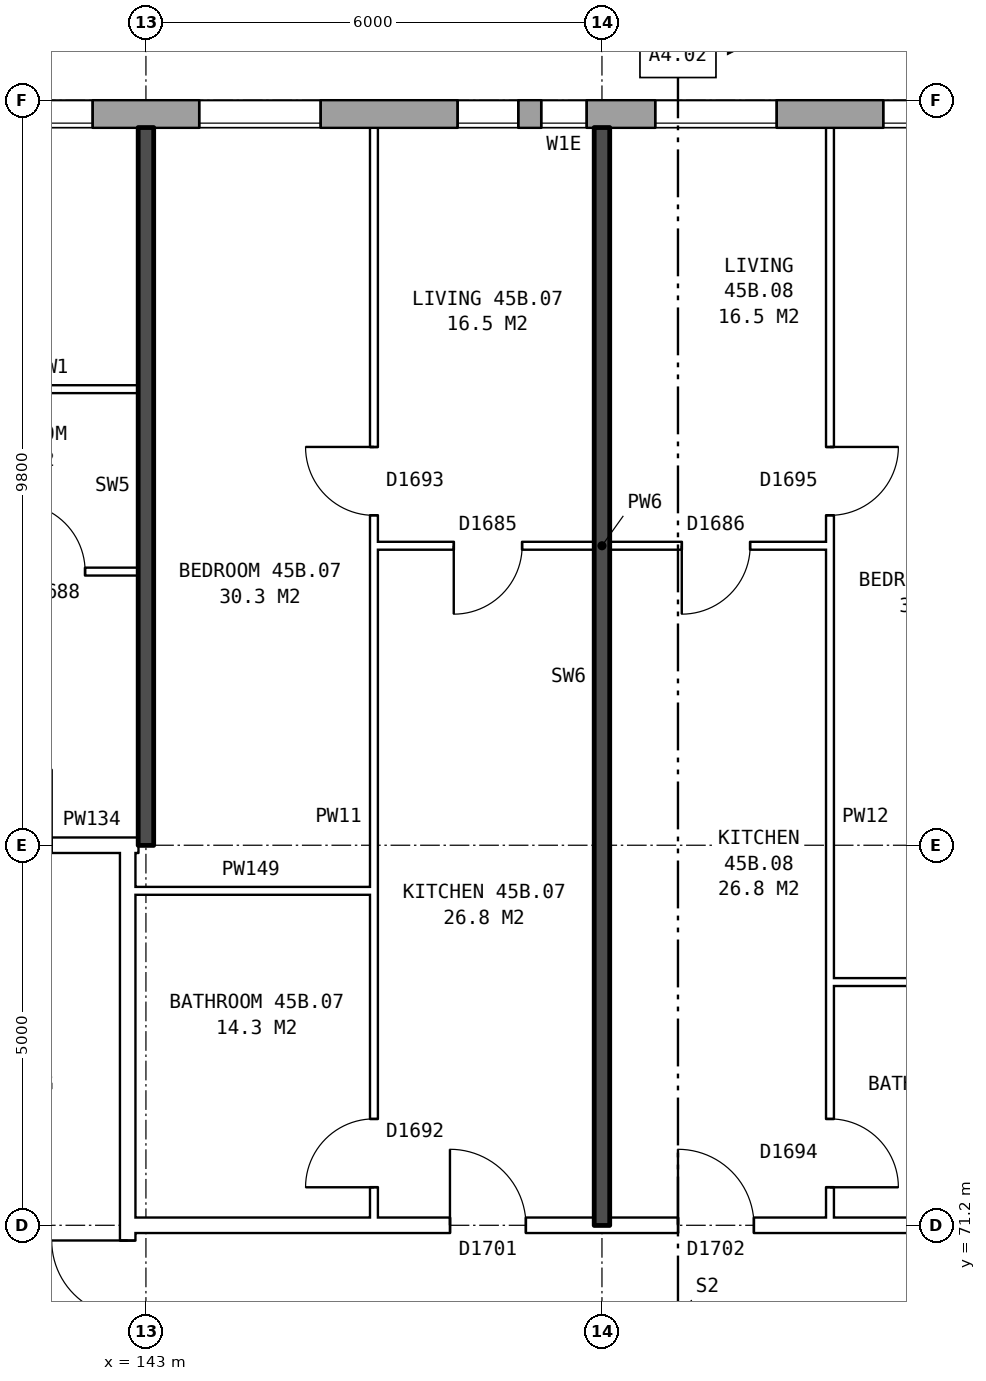
"""IFC4 building model, lengths in metres.
Left out: names, types, materials, properties, quantities, classifications, styles, units other than length and angle.
Written with IfcOpenShell. Run it as: python <this file> out.ifc"""

import sys

from ifc_helpers import new_model, si_unit, direction, frame, frame_2d, origin, place, context, subcontext, project, spatial, rectangle, extrude, element, fill, save


model = new_model("IFC4")
c1 = context("Model", 3, precision=1e-05, world=origin(), true_north=direction((0.0, 1.0)))
c2 = subcontext(c1, "Body", "Model", "MODEL_VIEW")
j1 = project(units=[si_unit("LENGTHUNIT", "METRE"), si_unit("PLANEANGLEUNIT", "RADIAN")], contexts=[c1])
p1 = place(None, origin())
s1 = spatial("IfcSite", under=j1, at=p1, CompositionType="ELEMENT")
p2 = place(p1, origin())
s2 = spatial("IfcBuilding", under=s1, at=p2, CompositionType="ELEMENT")
p3 = place(p2, frame((0.0, 0.0, 160.9)))
s3 = spatial("IfcBuildingStorey", under=s2, at=p3, CompositionType="ELEMENT", Elevation=160.9)
p4 = place(p3, frame((168.425, 85.82, 0.0), z_axis=(0.0, 0.0, 1.0), x_axis=(-1.0, 0.0, 0.0)))
e1 = element("IfcWall", 1, at=p4, inside=s3, PredefinedType="STANDARD", context=c2, shape_type="SweptSolid", body=[
    extrude(rectangle(XDim=34.351, YDim=0.36, at=frame_2d((17.175, 0.0))), origin(), (0.0, 0.0, 1.0), 2.85),
])
p5 = place(p4, frame((2.125, 0.0, 0.8)))
e2 = element("IfcOpeningElement", 2, at=p5, cuts=e1, PredefinedType="OPENING", context=c2, shape_type="SweptSolid", body=[
    extrude(rectangle(XDim=1.6, YDim=1.8, at=frame_2d((0.8, 0.9))), frame((0.0, 0.19, 0.0), z_axis=(0.0, -1.0, 0.0), x_axis=(1.0, 0.0, 0.0)), (0.0, 0.0, 1.0), 0.38),
])
p6 = place(p4, frame((5.125, 0.0, 0.8)))
e3 = element("IfcOpeningElement", 3, at=p6, cuts=e1, PredefinedType="OPENING", context=c2, shape_type="SweptSolid", body=[
    extrude(rectangle(XDim=1.6, YDim=1.8, at=frame_2d((0.8, 0.9))), frame((0.0, 0.19, 0.0), z_axis=(0.0, -1.0, 0.0), x_axis=(1.0, 0.0, 0.0)), (0.0, 0.0, 1.0), 0.38),
])
p7 = place(p4, frame((8.125, 0.0, 0.8)))
e4 = element("IfcOpeningElement", 4, at=p7, cuts=e1, PredefinedType="OPENING", context=c2, shape_type="SweptSolid", body=[
    extrude(rectangle(XDim=1.6, YDim=1.8, at=frame_2d((0.8, 0.9))), frame((0.0, 0.19, 0.0), z_axis=(0.0, -1.0, 0.0), x_axis=(1.0, 0.0, 0.0)), (0.0, 0.0, 1.0), 0.38),
])
p8 = place(p4, frame((10.025, 0.0, 0.8)))
e5 = element("IfcOpeningElement", 5, at=p8, cuts=e1, PredefinedType="OPENING", context=c2, shape_type="SweptSolid", body=[
    extrude(rectangle(XDim=1.0, YDim=1.8, at=frame_2d((0.5, 0.9))), frame((0.0, 0.19, 0.0), z_axis=(0.0, -1.0, 0.0), x_axis=(1.0, 0.0, 0.0)), (0.0, 0.0, 1.0), 0.38),
])
p9 = place(p4, frame((14.125, 0.0, 0.8)))
e6 = element("IfcOpeningElement", 6, at=p9, cuts=e1, PredefinedType="OPENING", context=c2, shape_type="SweptSolid", body=[
    extrude(rectangle(XDim=1.6, YDim=1.8, at=frame_2d((0.8, 0.9))), frame((0.0, 0.19, 0.0), z_axis=(0.0, -1.0, 0.0), x_axis=(1.0, 0.0, 0.0)), (0.0, 0.0, 1.0), 0.38),
])
p10 = place(p4, frame((17.125, 0.0, 0.8)))
e7 = element("IfcOpeningElement", 7, at=p10, cuts=e1, PredefinedType="OPENING", context=c2, shape_type="SweptSolid", body=[
    extrude(rectangle(XDim=1.6, YDim=1.8, at=frame_2d((0.8, 0.9))), frame((0.0, 0.19, 0.0), z_axis=(0.0, -1.0, 0.0), x_axis=(1.0, 0.0, 0.0)), (0.0, 0.0, 1.0), 0.38),
])
p11 = place(p4, frame((19.625, 0.0, 0.65)))
e8 = element("IfcOpeningElement", 8, at=p11, cuts=e1, PredefinedType="OPENING", context=c2, shape_type="SweptSolid", body=[
    extrude(rectangle(XDim=0.6, YDim=1.8, at=frame_2d((0.3, 0.9))), frame((0.0, 0.19, 0.0), z_axis=(0.0, -1.0, 0.0), x_axis=(1.0, 0.0, 0.0)), (0.0, 0.0, 1.0), 0.38),
])
p12 = place(p4, frame((23.125, 0.0, 0.8)))
e9 = element("IfcOpeningElement", 9, at=p12, cuts=e1, PredefinedType="OPENING", context=c2, shape_type="SweptSolid", body=[
    extrude(rectangle(XDim=1.6, YDim=1.8, at=frame_2d((0.8, 0.9))), frame((0.0, 0.19, 0.0), z_axis=(0.0, -1.0, 0.0), x_axis=(1.0, 0.0, 0.0)), (0.0, 0.0, 1.0), 0.38),
])
p13 = place(p4, frame((26.125, 0.0, 0.8)))
e10 = element("IfcOpeningElement", 10, at=p13, cuts=e1, PredefinedType="OPENING", context=c2, shape_type="SweptSolid", body=[
    extrude(rectangle(XDim=1.6, YDim=1.8, at=frame_2d((0.8, 0.9))), frame((0.0, 0.19, 0.0), z_axis=(0.0, -1.0, 0.0), x_axis=(1.0, 0.0, 0.0)), (0.0, 0.0, 1.0), 0.38),
])
p14 = place(p4, frame((29.125, 0.0, 0.8)))
e11 = element("IfcOpeningElement", 11, at=p14, cuts=e1, PredefinedType="OPENING", context=c2, shape_type="SweptSolid", body=[
    extrude(rectangle(XDim=1.6, YDim=1.8, at=frame_2d((0.8, 0.9))), frame((0.0, 0.19, 0.0), z_axis=(0.0, -1.0, 0.0), x_axis=(1.0, 0.0, 0.0)), (0.0, 0.0, 1.0), 0.38),
])
p15 = place(p4, frame((32.125, 0.0, 0.8)))
e12 = element("IfcOpeningElement", 12, at=p15, cuts=e1, PredefinedType="OPENING", context=c2, shape_type="SweptSolid", body=[
    extrude(rectangle(XDim=1.6, YDim=1.8, at=frame_2d((0.8, 0.9))), frame((0.0, 0.19, 0.0), z_axis=(0.0, -1.0, 0.0), x_axis=(1.0, 0.0, 0.0)), (0.0, 0.0, 1.0), 0.38),
])
p16 = place(p4, frame((11.325, 0.0, 1.7)))
e13 = element("IfcOpeningElement", 13, at=p16, cuts=e1, PredefinedType="OPENING", context=c2, shape_type="SweptSolid", body=[
    extrude(rectangle(XDim=0.8, YDim=0.9, at=frame_2d((0.4, 0.45))), frame((0.0, 0.19, 0.0), z_axis=(0.0, -1.0, 0.0), x_axis=(1.0, 0.0, 0.0)), (0.0, 0.0, 1.0), 0.38),
])
p17 = place(p4, frame((20.525, 0.0, 0.55)))
e14 = element("IfcOpeningElement", 14, at=p17, cuts=e1, PredefinedType="OPENING", context=c2, shape_type="SweptSolid", body=[
    extrude(rectangle(XDim=0.8, YDim=0.9, at=frame_2d((0.4, 0.45))), frame((0.0, 0.19, 0.0), z_axis=(0.0, -1.0, 0.0), x_axis=(1.0, 0.0, 0.0)), (0.0, 0.0, 1.0), 0.38),
])
p18 = place(p3, frame((142.76, 63.9, 0.0), z_axis=(0.0, 0.0, 1.0), x_axis=(0.0, 1.0, 0.0)))
e15 = element("IfcWall", 15, at=p18, inside=s3, PredefinedType="PARTITIONING", context=c2, shape_type="SweptSolid", body=[
    extrude(rectangle(XDim=12.2, YDim=0.2, at=frame_2d((6.1, 0.0))), origin(), (0.0, 0.0, 1.0), 2.85),
])
p19 = place(p18, frame((5.1, 0.0, 0.0)))
e16 = element("IfcOpeningElement", 16, at=p19, cuts=e15, PredefinedType="OPENING", context=c2, shape_type="SweptSolid", body=[
    extrude(rectangle(XDim=2.0, YDim=2.1, at=frame_2d((1.0, 1.05))), frame((0.0, 0.11, 0.0), z_axis=(0.0, -1.0, 0.0), x_axis=(1.0, 0.0, 0.0)), (0.0, 0.0, 1.0), 0.22),
])
p20 = place(p3, frame((142.76, 71.2, 0.0), z_axis=(0.0, 0.0, 1.0), x_axis=(1.0, 0.0, 0.0)))
e17 = element("IfcWall", 17, at=p20, inside=s3, PredefinedType="PARTITIONING", context=c2, shape_type="SweptSolid", body=[
    extrude(rectangle(XDim=14.48, YDim=0.2, at=frame_2d((7.24, 0.0))), origin(), (0.0, 0.0, 1.0), 2.85),
])
p21 = place(p20, frame((4.24, 0.0, 0.0)))
e18 = element("IfcOpeningElement", 18, at=p21, cuts=e17, PredefinedType="OPENING", context=c2, shape_type="SweptSolid", body=[
    extrude(rectangle(XDim=1.0, YDim=2.1, at=frame_2d((0.5, 1.05))), frame((0.0, 0.11, 0.0), z_axis=(0.0, -1.0, 0.0), x_axis=(1.0, 0.0, 0.0)), (0.0, 0.0, 1.0), 0.22),
])
p22 = place(p20, frame((7.24, 0.0, 0.0)))
e19 = element("IfcOpeningElement", 19, at=p22, cuts=e17, PredefinedType="OPENING", context=c2, shape_type="SweptSolid", body=[
    extrude(rectangle(XDim=1.0, YDim=2.1, at=frame_2d((0.5, 1.05))), frame((0.0, 0.11, 0.0), z_axis=(0.0, -1.0, 0.0), x_axis=(1.0, 0.0, 0.0)), (0.0, 0.0, 1.0), 0.22),
])
p23 = place(p3, frame((152.0, 74.4, 0.0), z_axis=(0.0, 0.0, 1.0), x_axis=(1.0, 0.0, 0.0)))
e20 = element("IfcWall", 20, at=p23, inside=s3, PredefinedType="PARTITIONING", context=c2, shape_type="SweptSolid", body=[
    extrude(rectangle(XDim=2.9, YDim=0.1, at=frame_2d((1.45, 0.0))), origin(), (0.0, 0.0, 1.0), 2.85),
])
p24 = place(p3, frame((142.76, 75.6, 0.0), z_axis=(0.0, 0.0, 1.0), x_axis=(1.0, 0.0, 0.0)))
e21 = element("IfcWall", 21, at=p24, inside=s3, PredefinedType="PARTITIONING", context=c2, shape_type="SweptSolid", body=[
    extrude(rectangle(XDim=3.24, YDim=0.1, at=frame_2d((1.62, 0.0))), origin(), (0.0, 0.0, 1.0), 2.85),
])
p25 = place(p3, frame((139.76, 76.2, 0.0), z_axis=(0.0, 0.0, 1.0), x_axis=(1.0, 0.0, 0.0)))
e22 = element("IfcWall", 22, at=p25, inside=s3, PredefinedType="PARTITIONING", context=c2, shape_type="SweptSolid", body=[
    extrude(rectangle(XDim=3.0, YDim=0.2, at=frame_2d((1.5, 0.0))), origin(), (0.0, 0.0, 1.0), 2.85),
])
p26 = place(p25, frame((1.0, 0.0, 0.0)))
e23 = element("IfcOpeningElement", 23, at=p26, cuts=e22, PredefinedType="OPENING", context=c2, shape_type="SweptSolid", body=[
    extrude(rectangle(XDim=1.0, YDim=2.1, at=frame_2d((0.5, 1.05))), frame((0.0, 0.11, 0.0), z_axis=(0.0, -1.0, 0.0), x_axis=(1.0, 0.0, 0.0)), (0.0, 0.0, 1.0), 0.22),
])
p27 = place(p3, frame((142.76, 76.2, 0.0), z_axis=(0.0, 0.0, 1.0), x_axis=(1.0, 0.0, 0.0)))
e24 = element("IfcWall", 24, at=p27, inside=s3, PredefinedType="PARTITIONING", context=c2, shape_type="SweptSolid", body=[
    extrude(rectangle(XDim=0.14, YDim=0.2, at=frame_2d((0.07, 0.0))), origin(), (0.0, 0.0, 1.0), 2.85),
])
p28 = place(p3, frame((137.1, 79.8, 0.0), z_axis=(0.0, 0.0, 1.0), x_axis=(1.0, 0.0, 0.0)))
e25 = element("IfcWall", 25, at=p28, inside=s3, PredefinedType="PARTITIONING", context=c2, shape_type="SweptSolid", body=[
    extrude(rectangle(XDim=5.8, YDim=0.1, at=frame_2d((2.9, 0.0))), origin(), (0.0, 0.0, 1.0), 2.85),
])
p29 = place(p28, frame((1.3, 0.0, 0.0)))
e26 = element("IfcOpeningElement", 26, at=p29, cuts=e25, PredefinedType="OPENING", context=c2, shape_type="SweptSolid", body=[
    extrude(rectangle(XDim=0.9, YDim=2.1, at=frame_2d((0.45, 1.05))), frame((0.0, 0.06, 0.0), z_axis=(0.0, -1.0, 0.0), x_axis=(1.0, 0.0, 0.0)), (0.0, 0.0, 1.0), 0.12),
])
p30 = place(p28, frame((4.2, 0.0, 0.0)))
e27 = element("IfcOpeningElement", 27, at=p30, cuts=e25, PredefinedType="OPENING", context=c2, shape_type="SweptSolid", body=[
    extrude(rectangle(XDim=0.9, YDim=2.1, at=frame_2d((0.45, 1.05))), frame((0.0, 0.06, 0.0), z_axis=(0.0, -1.0, 0.0), x_axis=(1.0, 0.0, 0.0)), (0.0, 0.0, 1.0), 0.12),
])
p31 = place(p3, frame((146.0, 80.14, 0.0), z_axis=(0.0, 0.0, 1.0), x_axis=(1.0, 0.0, 0.0)))
e28 = element("IfcWall", 28, at=p31, inside=s3, PredefinedType="PARTITIONING", context=c2, shape_type="SweptSolid", body=[
    extrude(rectangle(XDim=6.0, YDim=0.1, at=frame_2d((3.0, 0.0))), origin(), (0.0, 0.0, 1.0), 2.85),
])
p32 = place(p31, frame((1.05, 0.0, 0.0)))
e29 = element("IfcOpeningElement", 29, at=p32, cuts=e28, PredefinedType="OPENING", context=c2, shape_type="SweptSolid", body=[
    extrude(rectangle(XDim=0.9, YDim=2.1, at=frame_2d((0.45, 1.05))), frame((0.0, 0.06, 0.0), z_axis=(0.0, -1.0, 0.0), x_axis=(1.0, 0.0, 0.0)), (0.0, 0.0, 1.0), 0.12),
])
p33 = place(p31, frame((4.05, 0.0, 0.0)))
e30 = element("IfcOpeningElement", 30, at=p33, cuts=e28, PredefinedType="OPENING", context=c2, shape_type="SweptSolid", body=[
    extrude(rectangle(XDim=0.9, YDim=2.1, at=frame_2d((0.45, 1.05))), frame((0.0, 0.06, 0.0), z_axis=(0.0, -1.0, 0.0), x_axis=(1.0, 0.0, 0.0)), (0.0, 0.0, 1.0), 0.12),
])
p34 = place(p3, frame((140.6, 82.2, 0.0), z_axis=(0.0, 0.0, 1.0), x_axis=(1.0, 0.0, 0.0)))
e31 = element("IfcWall", 31, at=p34, inside=s3, PredefinedType="PARTITIONING", context=c2, shape_type="SweptSolid", body=[
    extrude(rectangle(XDim=2.3, YDim=0.1, at=frame_2d((1.15, 0.0))), origin(), (0.0, 0.0, 1.0), 2.85),
])
p35 = place(p3, frame((143.0, 76.2, 0.0), z_axis=(0.0, 0.0, 1.0), x_axis=(0.0, 1.0, 0.0)))
e32 = element("IfcWall", 32, at=p35, inside=s3, PredefinedType="SOLIDWALL", context=c2, shape_type="SweptSolid", body=[
    extrude(rectangle(XDim=9.44, YDim=0.2, at=frame_2d((4.72, 0.0))), origin(), (0.0, 0.0, 1.0), 2.85),
])
p36 = place(p3, frame((146.0, 71.3, 0.0), z_axis=(0.0, 0.0, 1.0), x_axis=(0.0, 1.0, 0.0)))
e33 = element("IfcWall", 33, at=p36, inside=s3, PredefinedType="PARTITIONING", context=c2, shape_type="SweptSolid", body=[
    extrude(rectangle(XDim=14.34, YDim=0.1, at=frame_2d((7.17, 0.0))), origin(), (0.0, 0.0, 1.0), 2.85),
])
p37 = place(p36, frame((9.24, 0.0, 0.0)))
e34 = element("IfcOpeningElement", 34, at=p37, cuts=e33, PredefinedType="OPENING", context=c2, shape_type="SweptSolid", body=[
    extrude(rectangle(XDim=0.9, YDim=2.1, at=frame_2d((0.45, 1.05))), frame((0.0, 0.06, 0.0), z_axis=(0.0, -1.0, 0.0), x_axis=(1.0, 0.0, 0.0)), (0.0, 0.0, 1.0), 0.12),
])
p38 = place(p36, frame((0.4, 0.0, 0.0)))
e35 = element("IfcOpeningElement", 35, at=p38, cuts=e33, PredefinedType="OPENING", context=c2, shape_type="SweptSolid", body=[
    extrude(rectangle(XDim=0.9, YDim=2.1, at=frame_2d((0.45, 1.05))), frame((0.0, 0.06, 0.0), z_axis=(0.0, -1.0, 0.0), x_axis=(1.0, 0.0, 0.0)), (0.0, 0.0, 1.0), 0.12),
])
p39 = place(p3, frame((149.0, 71.2, 0.0), z_axis=(0.0, 0.0, 1.0), x_axis=(0.0, 1.0, 0.0)))
e36 = element("IfcWall", 36, at=p39, inside=s3, PredefinedType="SOLIDWALL", context=c2, shape_type="SweptSolid", body=[
    extrude(rectangle(XDim=14.44, YDim=0.2, at=frame_2d((7.22, 0.0))), origin(), (0.0, 0.0, 1.0), 2.85),
])
p40 = place(p3, frame((152.0, 71.3, 0.0), z_axis=(0.0, 0.0, 1.0), x_axis=(0.0, 1.0, 0.0)))
e37 = element("IfcWall", 37, at=p40, inside=s3, PredefinedType="PARTITIONING", context=c2, shape_type="SweptSolid", body=[
    extrude(rectangle(XDim=14.34, YDim=0.1, at=frame_2d((7.17, 0.0))), origin(), (0.0, 0.0, 1.0), 2.85),
])
p41 = place(p40, frame((9.24, 0.0, 0.0)))
e38 = element("IfcOpeningElement", 38, at=p41, cuts=e37, PredefinedType="OPENING", context=c2, shape_type="SweptSolid", body=[
    extrude(rectangle(XDim=0.9, YDim=2.1, at=frame_2d((0.45, 1.05))), frame((0.0, 0.06, 0.0), z_axis=(0.0, -1.0, 0.0), x_axis=(1.0, 0.0, 0.0)), (0.0, 0.0, 1.0), 0.12),
])
p42 = place(p40, frame((0.4, 0.0, 0.0)))
e39 = element("IfcOpeningElement", 39, at=p42, cuts=e37, PredefinedType="OPENING", context=c2, shape_type="SweptSolid", body=[
    extrude(rectangle(XDim=0.9, YDim=2.1, at=frame_2d((0.45, 1.05))), frame((0.0, 0.06, 0.0), z_axis=(0.0, -1.0, 0.0), x_axis=(1.0, 0.0, 0.0)), (0.0, 0.0, 1.0), 0.12),
])
p43 = place(p9, origin())
e40 = element("IfcWindow", 40, at=p43, inside=s3, PartitioningType="SINGLE_PANEL", PredefinedType="WINDOW", context=c2, shape_type="SweptSolid", body=[
    extrude(rectangle(XDim=1.6, YDim=1.8, at=frame_2d((0.8, 0.9))), frame((0.0, 0.15, 0.0), z_axis=(0.0, -1.0, 0.0), x_axis=(1.0, 0.0, 0.0)), (0.0, 0.0, 1.0), 0.06),
])
fill(e6, e40)
p44 = place(p10, origin())
e41 = element("IfcWindow", 41, at=p44, inside=s3, PartitioningType="SINGLE_PANEL", PredefinedType="WINDOW", context=c2, shape_type="SweptSolid", body=[
    extrude(rectangle(XDim=1.6, YDim=1.8, at=frame_2d((0.8, 0.9))), frame((0.0, 0.15, 0.0), z_axis=(0.0, -1.0, 0.0), x_axis=(1.0, 0.0, 0.0)), (0.0, 0.0, 1.0), 0.06),
])
fill(e7, e41)
p45 = place(p11, origin())
e42 = element("IfcWindow", 42, at=p45, inside=s3, PartitioningType="SINGLE_PANEL", PredefinedType="WINDOW", context=c2, shape_type="SweptSolid", body=[
    extrude(rectangle(XDim=0.6, YDim=1.8, at=frame_2d((0.3, 0.9))), frame((0.0, 0.15, 0.0), z_axis=(0.0, -1.0, 0.0), x_axis=(1.0, 0.0, 0.0)), (0.0, 0.0, 1.0), 0.06),
])
fill(e8, e42)
p46 = place(p12, origin())
e43 = element("IfcWindow", 43, at=p46, inside=s3, PartitioningType="SINGLE_PANEL", PredefinedType="WINDOW", context=c2, shape_type="SweptSolid", body=[
    extrude(rectangle(XDim=1.6, YDim=1.8, at=frame_2d((0.8, 0.9))), frame((0.0, 0.15, 0.0), z_axis=(0.0, -1.0, 0.0), x_axis=(1.0, 0.0, 0.0)), (0.0, 0.0, 1.0), 0.06),
])
fill(e9, e43)
p47 = place(p13, origin())
e44 = element("IfcWindow", 44, at=p47, inside=s3, PartitioningType="SINGLE_PANEL", PredefinedType="WINDOW", context=c2, shape_type="SweptSolid", body=[
    extrude(rectangle(XDim=1.6, YDim=1.8, at=frame_2d((0.8, 0.9))), frame((0.0, 0.15, 0.0), z_axis=(0.0, -1.0, 0.0), x_axis=(1.0, 0.0, 0.0)), (0.0, 0.0, 1.0), 0.06),
])
fill(e10, e44)
p48 = place(p19, origin())
e45 = element("IfcDoor", 45, at=p48, inside=s3, OperationType="DOUBLE_DOOR_SINGLE_SWING", PredefinedType="DOOR", context=c2, shape_type="SweptSolid", body=[
    extrude(rectangle(XDim=2.0, YDim=2.1, at=frame_2d((1.0, 1.05))), frame((0.0, 0.025, 0.0), z_axis=(0.0, -1.0, 0.0), x_axis=(1.0, 0.0, 0.0)), (0.0, 0.0, 1.0), 0.05),
])
fill(e16, e45)
p49 = place(p30, origin())
e46 = element("IfcDoor", 46, at=p49, inside=s3, OperationType="SINGLE_SWING_LEFT", PredefinedType="DOOR", context=c2, shape_type="SweptSolid", body=[
    extrude(rectangle(XDim=0.9, YDim=2.1, at=frame_2d((0.45, 1.05))), frame((0.0, 0.025, 0.0), z_axis=(0.0, -1.0, 0.0), x_axis=(1.0, 0.0, 0.0)), (0.0, 0.0, 1.0), 0.05),
])
fill(e27, e46)
p50 = place(p37, origin())
e47 = element("IfcDoor", 47, at=p50, inside=s3, OperationType="SINGLE_SWING_RIGHT", PredefinedType="DOOR", context=c2, shape_type="SweptSolid", body=[
    extrude(rectangle(XDim=0.9, YDim=2.1, at=frame_2d((0.45, 1.05))), frame((0.0, 0.025, 0.0), z_axis=(0.0, -1.0, 0.0), x_axis=(1.0, 0.0, 0.0)), (0.0, 0.0, 1.0), 0.05),
])
fill(e34, e47)
p51 = place(p21, origin())
e48 = element("IfcDoor", 48, at=p51, inside=s3, OperationType="SINGLE_SWING_LEFT", PredefinedType="DOOR", context=c2, shape_type="SweptSolid", body=[
    extrude(rectangle(XDim=1.0, YDim=2.1, at=frame_2d((0.5, 1.05))), frame((0.0, 0.025, 0.0), z_axis=(0.0, -1.0, 0.0), x_axis=(1.0, 0.0, 0.0)), (0.0, 0.0, 1.0), 0.05),
])
fill(e18, e48)
p52 = place(p32, frame((0.9, 0.0, 0.0), z_axis=(0.0, 0.0, 1.0), x_axis=(-1.0, 0.0, 0.0)))
e49 = element("IfcDoor", 49, at=p52, inside=s3, OperationType="SINGLE_SWING_RIGHT", PredefinedType="DOOR", context=c2, shape_type="SweptSolid", body=[
    extrude(rectangle(XDim=0.9, YDim=2.1, at=frame_2d((0.45, 1.05))), frame((0.0, 0.025, 0.0), z_axis=(0.0, -1.0, 0.0), x_axis=(1.0, 0.0, 0.0)), (0.0, 0.0, 1.0), 0.05),
])
fill(e29, e49)
p53 = place(p38, origin())
e50 = element("IfcDoor", 50, at=p53, inside=s3, OperationType="SINGLE_SWING_LEFT", PredefinedType="DOOR", context=c2, shape_type="SweptSolid", body=[
    extrude(rectangle(XDim=0.9, YDim=2.1, at=frame_2d((0.45, 1.05))), frame((0.0, 0.025, 0.0), z_axis=(0.0, -1.0, 0.0), x_axis=(1.0, 0.0, 0.0)), (0.0, 0.0, 1.0), 0.05),
])
fill(e35, e50)
p54 = place(p41, frame((0.9, 0.0, 0.0), z_axis=(0.0, 0.0, 1.0), x_axis=(-1.0, 0.0, 0.0)))
e51 = element("IfcDoor", 51, at=p54, inside=s3, OperationType="SINGLE_SWING_LEFT", PredefinedType="DOOR", context=c2, shape_type="SweptSolid", body=[
    extrude(rectangle(XDim=0.9, YDim=2.1, at=frame_2d((0.45, 1.05))), frame((0.0, 0.025, 0.0), z_axis=(0.0, -1.0, 0.0), x_axis=(1.0, 0.0, 0.0)), (0.0, 0.0, 1.0), 0.05),
])
fill(e38, e51)
p55 = place(p22, origin())
e52 = element("IfcDoor", 52, at=p55, inside=s3, OperationType="SINGLE_SWING_LEFT", PredefinedType="DOOR", context=c2, shape_type="SweptSolid", body=[
    extrude(rectangle(XDim=1.0, YDim=2.1, at=frame_2d((0.5, 1.05))), frame((0.0, 0.025, 0.0), z_axis=(0.0, -1.0, 0.0), x_axis=(1.0, 0.0, 0.0)), (0.0, 0.0, 1.0), 0.05),
])
fill(e19, e52)
p56 = place(p33, frame((0.9, 0.0, 0.0), z_axis=(0.0, 0.0, 1.0), x_axis=(-1.0, 0.0, 0.0)))
e53 = element("IfcDoor", 53, at=p56, inside=s3, OperationType="SINGLE_SWING_RIGHT", PredefinedType="DOOR", context=c2, shape_type="SweptSolid", body=[
    extrude(rectangle(XDim=0.9, YDim=2.1, at=frame_2d((0.45, 1.05))), frame((0.0, 0.025, 0.0), z_axis=(0.0, -1.0, 0.0), x_axis=(1.0, 0.0, 0.0)), (0.0, 0.0, 1.0), 0.05),
])
fill(e30, e53)
p57 = place(p42, frame((0.9, 0.0, 0.0), z_axis=(0.0, 0.0, 1.0), x_axis=(-1.0, 0.0, 0.0)))
e54 = element("IfcDoor", 54, at=p57, inside=s3, OperationType="SINGLE_SWING_RIGHT", PredefinedType="DOOR", context=c2, shape_type="SweptSolid", body=[
    extrude(rectangle(XDim=0.9, YDim=2.1, at=frame_2d((0.45, 1.05))), frame((0.0, 0.025, 0.0), z_axis=(0.0, -1.0, 0.0), x_axis=(1.0, 0.0, 0.0)), (0.0, 0.0, 1.0), 0.05),
])
fill(e39, e54)
p58 = place(p17, origin())
e55 = element("IfcWindow", 55, at=p58, inside=s3, PartitioningType="SINGLE_PANEL", PredefinedType="WINDOW", context=c2, shape_type="SweptSolid", body=[
    extrude(rectangle(XDim=0.8, YDim=0.9, at=frame_2d((0.4, 0.45))), frame((0.0, 0.15, 0.0), z_axis=(0.0, -1.0, 0.0), x_axis=(1.0, 0.0, 0.0)), (0.0, 0.0, 1.0), 0.06),
])
fill(e14, e55)
save(model, sys.argv[1])
